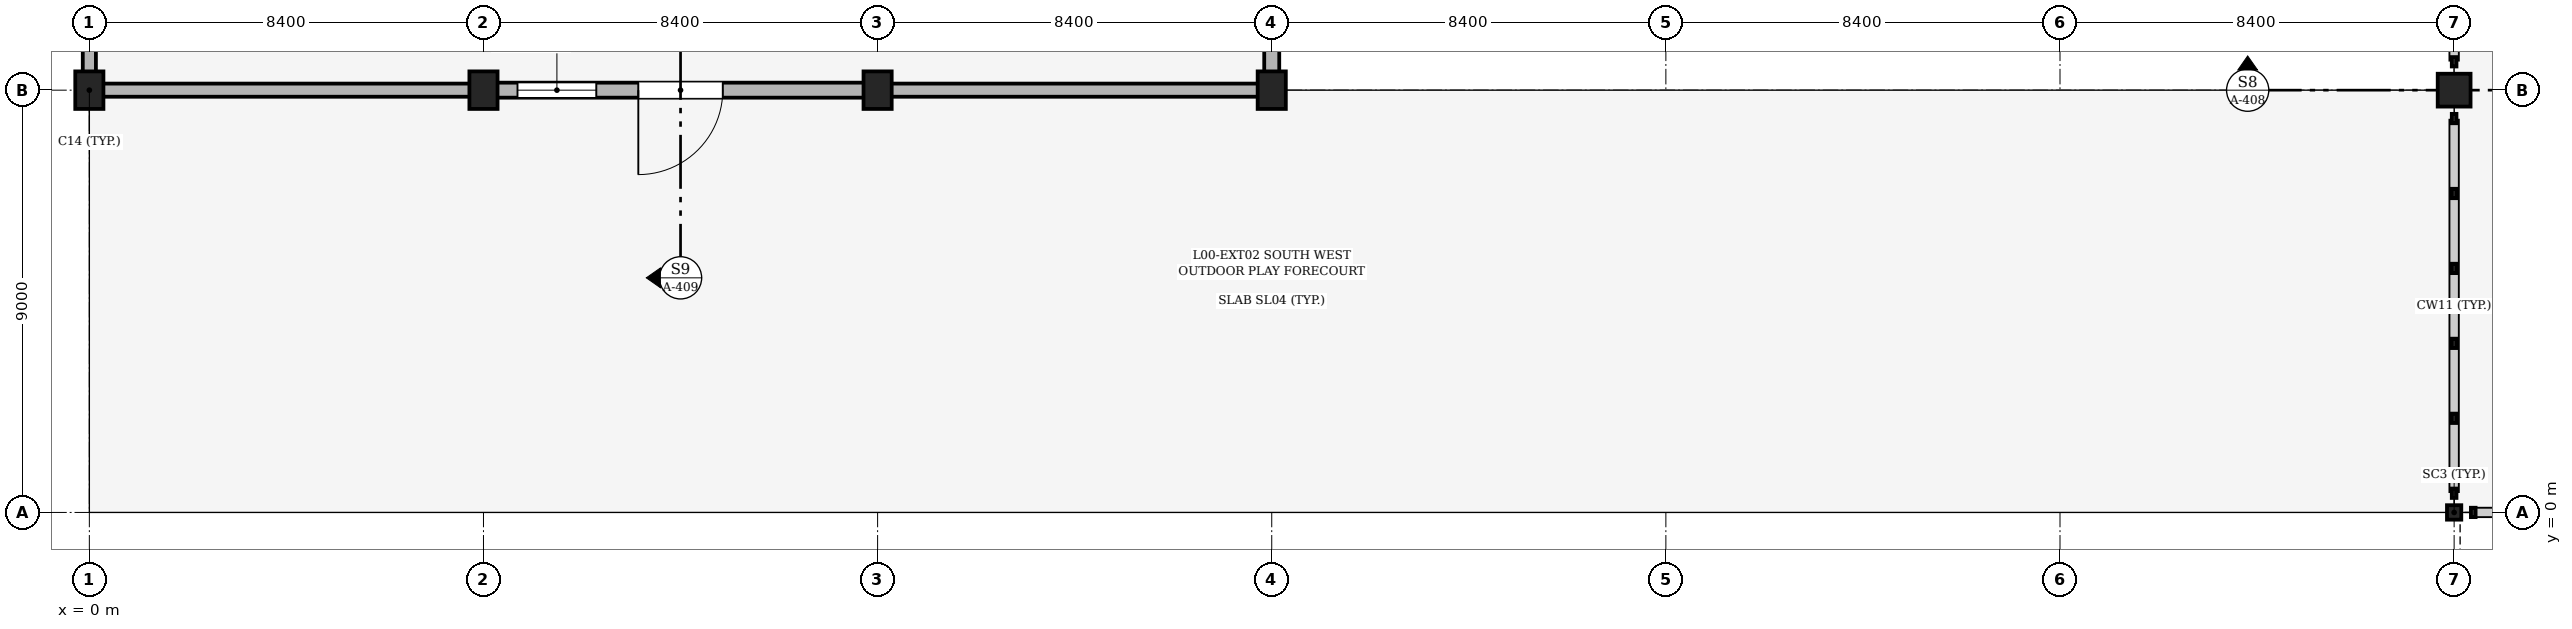
"""IFC4 building model, lengths in metres.
Left out: names, types, materials, properties, quantities, classifications, styles, units other than length and angle.
Written with IfcOpenShell. Run it as: python <this file> out.ifc"""

import sys

from ifc_helpers import new_model, si_unit, direction, frame, frame_2d, origin, origin_2d, place, context, subcontext, project, spatial, rectangle, i_section, extrude, element, fill, save


model = new_model("IFC4")
c1 = context("Model", 3, precision=1e-05, world=origin(), true_north=direction((0.0, 1.0)))
c2 = subcontext(c1, "Body", "Model", "MODEL_VIEW")
j1 = project(units=[si_unit("LENGTHUNIT", "METRE"), si_unit("PLANEANGLEUNIT", "RADIAN")], contexts=[c1])
p1 = place(None, origin())
s1 = spatial("IfcSite", under=j1, at=p1, CompositionType="ELEMENT")
p2 = place(p1, origin())
s2 = spatial("IfcBuilding", under=s1, at=p2, CompositionType="ELEMENT")
p3 = place(p2, origin())
s3 = spatial("IfcBuildingStorey", under=s2, at=p3, CompositionType="ELEMENT", Elevation=0.0)
for number, where, z_axis, x_axis in (
    (1, (0.0, 9.0, 0.0), (0.0, 0.0, 1.0), (1.0, 0.0, 0.0)),
    (2, (8.4, 9.0, 0.0), (0.0, 0.0, 1.0), (1.0, 0.0, 0.0)),
    (3, (16.8, 9.0, 0.0), (0.0, 0.0, 1.0), (1.0, 0.0, 0.0)),
    (4, (25.2, 9.0, 0.0), (0.0, 0.0, 1.0), (1.0, 0.0, 0.0)),
):
    element("IfcColumn", number, at=place(p3, frame(where, z_axis=z_axis, x_axis=x_axis)), inside=s3, PredefinedType="COLUMN", context=c2, shape_type="SweptSolid", body=[
        extrude(rectangle(XDim=0.6, YDim=0.8, at=origin_2d()), origin(), (0.0, 0.0, 1.0), 4.8),
    ])
p4 = place(p3, frame((50.4, 0.0, 0.0), z_axis=(0.0, 0.0, 1.0), x_axis=(1.0, 0.0, 0.0)))
e5 = element("IfcColumn", 5, at=p4, inside=s3, PredefinedType="COLUMN", context=c2, shape_type="SweptSolid", body=[
    extrude(i_section(OverallWidth=0.305, OverallDepth=0.308, WebThickness=0.01, FlangeThickness=0.015, FilletRadius=0.013, at=origin_2d()), origin(), (0.0, 0.0, 1.0), 4.8),
])
p5 = place(p3, frame((50.4, 9.0, 0.0), z_axis=(0.0, 0.0, 1.0), x_axis=(1.0, 0.0, 0.0)))
e6 = element("IfcColumn", 6, at=p5, inside=s3, PredefinedType="COLUMN", context=c2, shape_type="SweptSolid", body=[
    extrude(rectangle(XDim=0.7, YDim=0.7, at=origin_2d()), origin(), (0.0, 0.0, 1.0), 4.8),
])
p6 = place(p3, frame((0.0, 9.375, 0.0), z_axis=(0.0, 0.0, 1.0), x_axis=(0.0, 1.0, 0.0)))
e7 = element("IfcWall", 7, at=p6, inside=s3, PredefinedType="SOLIDWALL", context=c2, shape_type="SweptSolid", body=[
    extrude(rectangle(XDim=8.25, YDim=0.28, at=frame_2d((4.125, 0.0))), origin(), (0.0, 0.0, 1.0), 4.267),
])
p7 = place(p3, frame((0.275, 9.0, 0.0), z_axis=(0.0, 0.0, 1.0), x_axis=(1.0, 0.0, 0.0)))
e8 = element("IfcWall", 8, at=p7, inside=s3, PredefinedType="SOLIDWALL", context=c2, shape_type="SweptSolid", body=[
    extrude(rectangle(XDim=7.85, YDim=0.28, at=frame_2d((3.925, 0.0))), origin(), (0.0, 0.0, 1.0), 4.267),
])
p8 = place(p3, frame((8.675, 9.0, 0.0), z_axis=(0.0, 0.0, 1.0), x_axis=(1.0, 0.0, 0.0)))
e9 = element("IfcWall", 9, at=p8, inside=s3, PredefinedType="SOLIDWALL", context=c2, shape_type="SweptSolid", body=[
    extrude(rectangle(XDim=7.85, YDim=0.32, at=frame_2d((3.925, 0.0))), origin(), (0.0, 0.0, 1.0), 4.267),
])
p9 = place(p8, frame((4.825, 0.0, 0.0), z_axis=(0.0, 0.0, 1.0), x_axis=(-1.0, 0.0, 0.0)))
e10 = element("IfcOpeningElement", 10, at=p9, cuts=e9, PredefinedType="OPENING", context=c2, shape_type="SweptSolid", body=[
    extrude(rectangle(XDim=1.8, YDim=2.35, at=frame_2d((0.9, 1.175))), frame((0.0, 0.17, 0.0), z_axis=(0.0, -1.0, 0.0), x_axis=(1.0, 0.0, 0.0)), (0.0, 0.0, 1.0), 0.34),
])
p10 = place(p8, frame((0.45, 0.0, 0.95)))
e11 = element("IfcOpeningElement", 11, at=p10, cuts=e9, PredefinedType="OPENING", context=c2, shape_type="SweptSolid", body=[
    extrude(rectangle(XDim=1.68, YDim=1.8, at=frame_2d((0.84, 0.9))), frame((0.0, 0.17, 0.0), z_axis=(0.0, -1.0, 0.0), x_axis=(1.0, 0.0, 0.0)), (0.0, 0.0, 1.0), 0.34),
])
p11 = place(p3, frame((17.075, 9.0, 0.0), z_axis=(0.0, 0.0, 1.0), x_axis=(1.0, 0.0, 0.0)))
e12 = element("IfcWall", 12, at=p11, inside=s3, PredefinedType="SOLIDWALL", context=c2, shape_type="SweptSolid", body=[
    extrude(rectangle(XDim=7.85, YDim=0.28, at=frame_2d((3.925, 0.0))), origin(), (0.0, 0.0, 1.0), 4.267),
])
p12 = place(p3, frame((25.2, 9.375, 0.0), z_axis=(0.0, 0.0, 1.0), x_axis=(0.0, 1.0, 0.0)))
e13 = element("IfcWall", 13, at=p12, inside=s3, PredefinedType="SOLIDWALL", context=c2, shape_type="SweptSolid", body=[
    extrude(rectangle(XDim=8.25, YDim=0.32, at=frame_2d((4.125, 0.0))), origin(), (0.0, 0.0, 1.0), 4.267),
])
p13 = place(p12, frame((2.925, 0.0, 0.9)))
e14 = element("IfcOpeningElement", 14, at=p13, cuts=e13, PredefinedType="OPENING", context=c2, shape_type="SweptSolid", body=[
    extrude(rectangle(XDim=2.4, YDim=1.8, at=frame_2d((1.2, 0.9))), frame((0.0, 0.17, 0.0), z_axis=(0.0, -1.0, 0.0), x_axis=(1.0, 0.0, 0.0)), (0.0, 0.0, 1.0), 0.34),
])
p14 = place(p9, origin())
e15 = element("IfcDoor", 15, at=p14, inside=s3, OperationType="DOUBLE_DOOR_SINGLE_SWING", PredefinedType="DOOR", context=c2, shape_type="SweptSolid", body=[
    extrude(rectangle(XDim=1.8, YDim=2.35, at=frame_2d((0.9, 1.175))), frame((0.0, 0.025, 0.0), z_axis=(0.0, -1.0, 0.0), x_axis=(1.0, 0.0, 0.0)), (0.0, 0.0, 1.0), 0.05),
])
fill(e10, e15)
p15 = place(p10, origin())
e16 = element("IfcWindow", 16, at=p15, inside=s3, PartitioningType="SINGLE_PANEL", PredefinedType="WINDOW", context=c2, shape_type="SweptSolid", body=[
    extrude(rectangle(XDim=1.68, YDim=1.8, at=frame_2d((0.84, 0.9))), frame((0.0, 0.03, 0.0), z_axis=(0.0, -1.0, 0.0), x_axis=(1.0, 0.0, 0.0)), (0.0, 0.0, 1.0), 0.06),
])
fill(e11, e16)
save(model, sys.argv[1])
